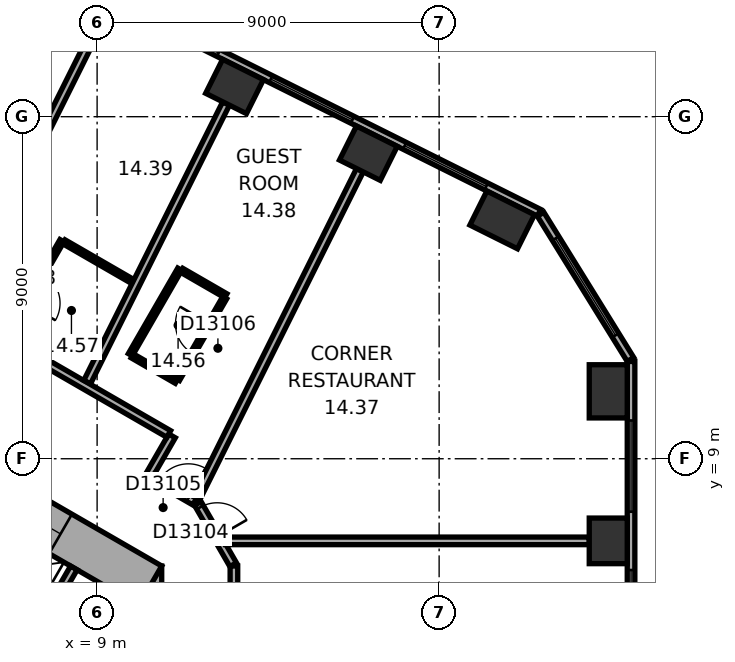
"""IFC4 building model, lengths in metres.
Left out: names, types, materials, properties, quantities, classifications, styles, units other than length and angle.
Written with IfcOpenShell. Run it as: python <this file> out.ifc"""

import sys

from ifc_helpers import new_model, si_unit, direction, frame, frame_2d, origin, origin_2d, place, context, subcontext, project, spatial, rectangle, extrude, element, fill, save


model = new_model("IFC4")
c1 = context("Model", 3, precision=1e-05, world=origin(), true_north=direction((0.0, 1.0)))
c2 = subcontext(c1, "Body", "Model", "MODEL_VIEW")
j1 = project(units=[si_unit("LENGTHUNIT", "METRE"), si_unit("PLANEANGLEUNIT", "RADIAN")], contexts=[c1])
p1 = place(None, origin())
s1 = spatial("IfcSite", under=j1, at=p1, CompositionType="ELEMENT")
p2 = place(p1, origin())
s2 = spatial("IfcBuilding", under=s1, at=p2, CompositionType="ELEMENT")
p3 = place(p2, frame((0.0, 0.0, 67.1)))
s3 = spatial("IfcBuildingStorey", under=s2, at=p3, CompositionType="ELEMENT", Elevation=67.1)
p4 = place(p3, frame((22.45, 6.839, 0.0), z_axis=(0.0, 0.0, 1.0), x_axis=(0.0, 1.0, 0.0)))
e1 = element("IfcColumn", 1, at=p4, inside=s3, PredefinedType="COLUMN", context=c2, shape_type="SweptSolid", body=[
    extrude(rectangle(XDim=1.2, YDim=1.0, at=origin_2d()), origin(), (0.0, 0.0, 1.0), 3.3),
])
for number, where, z_axis, x_axis in (
    (2, (22.45, 10.774, 0.0), (0.0, 0.0, 1.0), (0.0, 1.0, 0.0)),
    (3, (19.659, 15.284, 0.0), (0.0, 0.0, 1.0), (-0.895, 0.446, 0.0)),
):
    element("IfcColumn", number, at=place(p3, frame(where, z_axis=z_axis, x_axis=x_axis)), inside=s3, PredefinedType="COLUMN", context=c2, shape_type="SweptSolid", body=[
        extrude(rectangle(XDim=1.4, YDim=1.0, at=origin_2d()), origin(), (0.0, 0.0, 1.0), 3.3),
    ])
for number, where, z_axis, x_axis in (
    (4, (16.138, 17.04, 0.0), (0.0, 0.0, 1.0), (-0.895, 0.446, 0.0)),
    (5, (12.616, 18.795, 0.0), (0.0, 0.0, 1.0), (-0.895, 0.446, 0.0)),
):
    element("IfcColumn", number, at=place(p3, frame(where, z_axis=z_axis, x_axis=x_axis)), inside=s3, PredefinedType="COLUMN", context=c2, shape_type="SweptSolid", body=[
        extrude(rectangle(XDim=1.2, YDim=1.0, at=origin_2d()), origin(), (0.0, 0.0, 1.0), 3.3),
    ])
p5 = place(p3, frame((10.1, -6.177, 0.0), z_axis=(0.0, 0.0, 1.0), x_axis=(0.0, 1.0, 0.0)))
e6 = element("IfcWall", 6, at=p5, inside=s3, PredefinedType="SHEAR", context=c2, shape_type="SweptSolid", body=[
    extrude(rectangle(XDim=12.355, YDim=1.2, at=frame_2d((6.177, 0.0))), origin(), (0.0, 0.0, 1.0), 3.3),
])
p6 = place(p5, frame((6.378, 0.0, 0.0)))
e7 = element("IfcOpeningElement", 7, at=p6, cuts=e6, PredefinedType="OPENING", context=c2, shape_type="SweptSolid", body=[
    extrude(rectangle(XDim=1.5, YDim=2.1, at=frame_2d((0.75, 1.05))), frame((0.0, 0.61, 0.0), z_axis=(0.0, -1.0, 0.0), x_axis=(1.0, 0.0, 0.0)), (0.0, 0.0, 1.0), 1.22),
])
p7 = place(p5, frame((1.828, 0.0, 0.0)))
e8 = element("IfcOpeningElement", 8, at=p7, cuts=e6, PredefinedType="OPENING", context=c2, shape_type="SweptSolid", body=[
    extrude(rectangle(XDim=1.1, YDim=2.1, at=frame_2d((0.55, 1.05))), frame((0.0, 0.61, 0.0), z_axis=(0.0, -1.0, 0.0), x_axis=(1.0, 0.0, 0.0)), (0.0, 0.0, 1.0), 1.22),
])
p8 = place(p5, frame((4.427, 0.0, 0.0)))
e9 = element("IfcOpeningElement", 9, at=p8, cuts=e6, PredefinedType="OPENING", context=c2, shape_type="SweptSolid", body=[
    extrude(rectangle(XDim=1.1, YDim=2.1, at=frame_2d((0.55, 1.05))), frame((0.0, 0.61, 0.0), z_axis=(0.0, -1.0, 0.0), x_axis=(1.0, 0.0, 0.0)), (0.0, 0.0, 1.0), 1.22),
])
p9 = place(p3, frame((10.4, 5.658, 0.0), z_axis=(0.0, 0.0, 1.0), x_axis=(-0.866021384402, 0.500006961711, 0.0)))
e10 = element("IfcWall", 10, at=p9, inside=s3, PredefinedType="SHEAR", context=c2, shape_type="SweptSolid", body=[
    extrude(rectangle(XDim=12.355, YDim=1.2, at=frame_2d((6.178, 0.0))), origin(), (0.0, 0.0, 1.0), 3.3),
])
p10 = place(p9, frame((2.728, 0.0, 0.0)))
e11 = element("IfcOpeningElement", 11, at=p10, cuts=e10, PredefinedType="OPENING", context=c2, shape_type="SweptSolid", body=[
    extrude(rectangle(XDim=1.1, YDim=2.1, at=frame_2d((0.55, 1.05))), frame((0.0, 0.61, 0.0), z_axis=(0.0, -1.0, 0.0), x_axis=(1.0, 0.0, 0.0)), (0.0, 0.0, 1.0), 1.22),
])
p11 = place(p9, frame((5.328, 0.0, 0.0)))
e12 = element("IfcOpeningElement", 12, at=p11, cuts=e10, PredefinedType="OPENING", context=c2, shape_type="SweptSolid", body=[
    extrude(rectangle(XDim=1.1, YDim=2.1, at=frame_2d((0.55, 1.05))), frame((0.0, 0.61, 0.0), z_axis=(0.0, -1.0, 0.0), x_axis=(1.0, 0.0, 0.0)), (0.0, 0.0, 1.0), 1.22),
])
p12 = place(p9, frame((7.928, 0.0, 0.0)))
e13 = element("IfcOpeningElement", 13, at=p12, cuts=e10, PredefinedType="OPENING", context=c2, shape_type="SweptSolid", body=[
    extrude(rectangle(XDim=1.1, YDim=2.1, at=frame_2d((0.55, 1.05))), frame((0.0, 0.61, 0.0), z_axis=(0.0, -1.0, 0.0), x_axis=(1.0, 0.0, 0.0)), (0.0, 0.0, 1.0), 1.22),
])
p13 = place(p3, frame((23.05, -9.687, 0.0), z_axis=(0.0, 0.0, 1.0), x_axis=(0.0, 1.0, 0.0)))
e14 = element("IfcWall", 14, at=p13, inside=s3, PredefinedType="STANDARD", context=c2, shape_type="SweptSolid", body=[
    extrude(rectangle(XDim=21.246, YDim=0.2, at=frame_2d((10.623, 0.0))), origin(), (0.0, 0.0, 1.0), 3.3),
])
p14 = place(p13, frame((1.555, 0.0, 0.8)))
e15 = element("IfcOpeningElement", 15, at=p14, cuts=e14, PredefinedType="OPENING", context=c2, shape_type="SweptSolid", body=[
    extrude(rectangle(XDim=2.4, YDim=1.7, at=frame_2d((1.2, 0.85))), frame((0.0, 0.11, 0.0), z_axis=(0.0, -1.0, 0.0), x_axis=(1.0, 0.0, 0.0)), (0.0, 0.0, 1.0), 0.22),
])
p15 = place(p13, frame((5.489, 0.0, 0.8)))
e16 = element("IfcOpeningElement", 16, at=p15, cuts=e14, PredefinedType="OPENING", context=c2, shape_type="SweptSolid", body=[
    extrude(rectangle(XDim=2.4, YDim=1.7, at=frame_2d((1.2, 0.85))), frame((0.0, 0.11, 0.0), z_axis=(0.0, -1.0, 0.0), x_axis=(1.0, 0.0, 0.0)), (0.0, 0.0, 1.0), 0.22),
])
p16 = place(p13, frame((9.424, 0.0, 0.8)))
e17 = element("IfcOpeningElement", 17, at=p16, cuts=e14, PredefinedType="OPENING", context=c2, shape_type="SweptSolid", body=[
    extrude(rectangle(XDim=2.4, YDim=1.7, at=frame_2d((1.2, 0.85))), frame((0.0, 0.11, 0.0), z_axis=(0.0, -1.0, 0.0), x_axis=(1.0, 0.0, 0.0)), (0.0, 0.0, 1.0), 0.22),
])
p17 = place(p13, frame((13.358, 0.0, 0.8)))
e18 = element("IfcOpeningElement", 18, at=p17, cuts=e14, PredefinedType="OPENING", context=c2, shape_type="SweptSolid", body=[
    extrude(rectangle(XDim=2.4, YDim=1.7, at=frame_2d((1.2, 0.85))), frame((0.0, 0.11, 0.0), z_axis=(0.0, -1.0, 0.0), x_axis=(1.0, 0.0, 0.0)), (0.0, 0.0, 1.0), 0.22),
])
p18 = place(p13, frame((17.293, 0.0, 0.8)))
e19 = element("IfcOpeningElement", 19, at=p18, cuts=e14, PredefinedType="OPENING", context=c2, shape_type="SweptSolid", body=[
    extrude(rectangle(XDim=2.4, YDim=1.7, at=frame_2d((1.2, 0.85))), frame((0.0, 0.11, 0.0), z_axis=(0.0, -1.0, 0.0), x_axis=(1.0, 0.0, 0.0)), (0.0, 0.0, 1.0), 0.22),
])
p19 = place(p3, frame((23.035, 11.612, 0.0), z_axis=(0.0, 0.0, 1.0), x_axis=(-0.526160091227, 0.850385535155, 0.0)))
e20 = element("IfcWall", 20, at=p19, inside=s3, PredefinedType="STANDARD", context=c2, shape_type="SweptSolid", body=[
    extrude(rectangle(XDim=4.494, YDim=0.2, at=frame_2d((2.247, 0.0))), origin(), (0.0, 0.0, 1.0), 3.3),
])
p20 = place(p19, frame((0.747, 0.0, 0.8)))
e21 = element("IfcOpeningElement", 21, at=p20, cuts=e20, PredefinedType="OPENING", context=c2, shape_type="SweptSolid", body=[
    extrude(rectangle(XDim=3.0, YDim=1.7, at=frame_2d((1.5, 0.85))), frame((0.0, 0.11, 0.0), z_axis=(0.0, -1.0, 0.0), x_axis=(1.0, 0.0, 0.0)), (0.0, 0.0, 1.0), 0.22),
])
p21 = place(p3, frame((20.63, 15.47, 0.0), z_axis=(0.0, 0.0, 1.0), x_axis=(-0.894934518609, 0.446197498203, 0.0)))
e22 = element("IfcWall", 22, at=p21, inside=s3, PredefinedType="STANDARD", context=c2, shape_type="SweptSolid", body=[
    extrude(rectangle(XDim=21.246, YDim=0.2, at=frame_2d((10.623, 0.0))), origin(), (0.0, 0.0, 1.0), 3.3),
])
p22 = place(p21, frame((1.553, 0.0, 0.8)))
e23 = element("IfcOpeningElement", 23, at=p22, cuts=e22, PredefinedType="OPENING", context=c2, shape_type="SweptSolid", body=[
    extrude(rectangle(XDim=2.4, YDim=1.7, at=frame_2d((1.2, 0.85))), frame((0.0, 0.11, 0.0), z_axis=(0.0, -1.0, 0.0), x_axis=(1.0, 0.0, 0.0)), (0.0, 0.0, 1.0), 0.22),
])
p23 = place(p21, frame((5.488, 0.0, 0.8)))
e24 = element("IfcOpeningElement", 24, at=p23, cuts=e22, PredefinedType="OPENING", context=c2, shape_type="SweptSolid", body=[
    extrude(rectangle(XDim=2.4, YDim=1.7, at=frame_2d((1.2, 0.85))), frame((0.0, 0.11, 0.0), z_axis=(0.0, -1.0, 0.0), x_axis=(1.0, 0.0, 0.0)), (0.0, 0.0, 1.0), 0.22),
])
p24 = place(p21, frame((9.422, 0.0, 0.8)))
e25 = element("IfcOpeningElement", 25, at=p24, cuts=e22, PredefinedType="OPENING", context=c2, shape_type="SweptSolid", body=[
    extrude(rectangle(XDim=2.4, YDim=1.7, at=frame_2d((1.2, 0.85))), frame((0.0, 0.11, 0.0), z_axis=(0.0, -1.0, 0.0), x_axis=(1.0, 0.0, 0.0)), (0.0, 0.0, 1.0), 0.22),
])
p25 = place(p21, frame((13.357, 0.0, 0.8)))
e26 = element("IfcOpeningElement", 26, at=p25, cuts=e22, PredefinedType="OPENING", context=c2, shape_type="SweptSolid", body=[
    extrude(rectangle(XDim=2.4, YDim=1.7, at=frame_2d((1.2, 0.85))), frame((0.0, 0.11, 0.0), z_axis=(0.0, -1.0, 0.0), x_axis=(1.0, 0.0, 0.0)), (0.0, 0.0, 1.0), 0.22),
])
p26 = place(p21, frame((17.292, 0.0, 0.8)))
e27 = element("IfcOpeningElement", 27, at=p26, cuts=e22, PredefinedType="OPENING", context=c2, shape_type="SweptSolid", body=[
    extrude(rectangle(XDim=2.4, YDim=1.7, at=frame_2d((1.2, 0.85))), frame((0.0, 0.11, 0.0), z_axis=(0.0, -1.0, 0.0), x_axis=(1.0, 0.0, 0.0)), (0.0, 0.0, 1.0), 0.22),
])
p27 = place(p3, frame((7.287, 4.222, 0.0), z_axis=(0.0, 0.0, 1.0), x_axis=(0.499946605688, 0.86605622881, 0.0)))
e28 = element("IfcWall", 28, at=p27, inside=s3, PredefinedType="PARTITIONING", context=c2, shape_type="SweptSolid", body=[
    extrude(rectangle(XDim=2.2, YDim=0.2, at=frame_2d((1.1, 0.0))), origin(), (0.0, 0.0, 1.0), 3.05),
])
p28 = place(p3, frame((6.625, 12.227, 0.0), z_axis=(0.0, 0.0, 1.0), x_axis=(0.500023687443, 0.866011727401, 0.0)))
e29 = element("IfcWall", 29, at=p28, inside=s3, PredefinedType="PARTITIONING", context=c2, shape_type="SweptSolid", body=[
    extrude(rectangle(XDim=2.9, YDim=0.12, at=frame_2d((1.45, 0.0))), origin(), (0.0, 0.0, 1.0), 3.05),
])
p29 = place(p28, frame((1.0, 0.0, 0.0)))
e30 = element("IfcOpeningElement", 30, at=p29, cuts=e29, PredefinedType="OPENING", context=c2, shape_type="SweptSolid", body=[
    extrude(rectangle(XDim=0.9, YDim=2.1, at=frame_2d((0.45, 1.05))), frame((0.0, 0.07, 0.0), z_axis=(0.0, -1.0, 0.0), x_axis=(1.0, 0.0, 0.0)), (0.0, 0.0, 1.0), 0.14),
])
p30 = place(p3, frame((8.127, 14.708, 0.0), z_axis=(0.0, 0.0, 1.0), x_axis=(0.866065472234, -0.499930592986, 0.0)))
e31 = element("IfcWall", 31, at=p30, inside=s3, PredefinedType="PARTITIONING", context=c2, shape_type="SweptSolid", body=[
    extrude(rectangle(XDim=2.098, YDim=0.12, at=frame_2d((1.049, 0.0))), origin(), (0.0, 0.0, 1.0), 3.05),
])
p31 = place(p3, frame((8.872, 20.104, 0.0), z_axis=(0.0, 0.0, 1.0), x_axis=(-0.446218378653, -0.894924107706, 0.0)))
e32 = element("IfcWall", 32, at=p31, inside=s3, PredefinedType="PARTITIONING", context=c2, shape_type="SweptSolid", body=[
    extrude(rectangle(XDim=7.95, YDim=0.2, at=frame_2d((3.975, 0.0))), origin(), (0.0, 0.0, 1.0), 3.05),
])
p32 = place(p3, frame((9.875, 11.736, 0.0), z_axis=(0.0, 0.0, 1.0), x_axis=(0.499936506574, 0.866062058628, 0.0)))
e33 = element("IfcWall", 33, at=p32, inside=s3, PredefinedType="PARTITIONING", context=c2, shape_type="SweptSolid", body=[
    extrude(rectangle(XDim=2.6, YDim=0.12, at=frame_2d((1.3, 0.0))), origin(), (0.0, 0.0, 1.0), 3.05),
])
p33 = place(p3, frame((10.371, 8.561, 0.0), z_axis=(0.0, 0.0, 1.0), x_axis=(0.499986357472, 0.866033280158, 0.0)))
e34 = element("IfcWall", 34, at=p33, inside=s3, PredefinedType="PARTITIONING", context=c2, shape_type="SweptSolid", body=[
    extrude(rectangle(XDim=1.201, YDim=0.2, at=frame_2d((0.601, 0.0))), origin(), (0.0, 0.0, 1.0), 3.05),
])
p34 = place(p3, frame((10.885, 9.652, 0.0), z_axis=(0.0, 0.0, 1.0), x_axis=(-0.866033868542, 0.499985338323, 0.0)))
e35 = element("IfcWall", 35, at=p34, inside=s3, PredefinedType="PARTITIONING", context=c2, shape_type="SweptSolid", body=[
    extrude(rectangle(XDim=8.602, YDim=0.2, at=frame_2d((4.301, 0.0))), origin(), (0.0, 0.0, 1.0), 3.05),
])
p35 = place(p34, frame((5.302, 0.0, 0.0)))
e36 = element("IfcOpeningElement", 36, at=p35, cuts=e35, PredefinedType="OPENING", context=c2, shape_type="SweptSolid", body=[
    extrude(rectangle(XDim=0.9, YDim=2.1, at=frame_2d((0.45, 1.05))), frame((0.0, 0.11, 0.0), z_axis=(0.0, -1.0, 0.0), x_axis=(1.0, 0.0, 0.0)), (0.0, 0.0, 1.0), 0.22),
])
for number, where, z_axis, x_axis in (
    (37, (11.087, 11.036, 0.0), (0.0, 0.0, 1.0), (-0.866, 0.5, 0.0)),
    (38, (11.226, 13.958, 0.0), (0.0, 0.0, 1.0), (0.866, -0.5, 0.0)),
):
    element("IfcWall", number, at=place(p3, frame(where, z_axis=z_axis, x_axis=x_axis)), inside=s3, PredefinedType="PARTITIONING", context=c2, shape_type="SweptSolid", body=[
        extrude(rectangle(XDim=1.34, YDim=0.12, at=frame_2d((0.67, 0.0))), origin(), (0.0, 0.0, 1.0), 3.05),
    ])
p36 = place(p3, frame((11.566, 7.871, 0.0), z_axis=(0.0, 0.0, 1.0), x_axis=(-0.866004557827, 0.500036104519, 0.0)))
e39 = element("IfcWall", 39, at=p36, inside=s3, PredefinedType="PARTITIONING", context=c2, shape_type="SweptSolid", body=[
    extrude(rectangle(XDim=1.28, YDim=0.2, at=frame_2d((0.64, 0.0))), origin(), (0.0, 0.0, 1.0), 3.05),
])
p37 = place(p36, frame((0.19, 0.0, 0.0)))
e40 = element("IfcOpeningElement", 40, at=p37, cuts=e39, PredefinedType="OPENING", context=c2, shape_type="SweptSolid", body=[
    extrude(rectangle(XDim=0.9, YDim=2.1, at=frame_2d((0.45, 1.05))), frame((0.0, 0.11, 0.0), z_axis=(0.0, -1.0, 0.0), x_axis=(1.0, 0.0, 0.0)), (0.0, 0.0, 1.0), 0.22),
])
p38 = place(p3, frame((12.357, 13.236, 0.0), z_axis=(0.0, 0.0, 1.0), x_axis=(-0.50000366821, -0.866023285932, 0.0)))
e41 = element("IfcWall", 41, at=p38, inside=s3, PredefinedType="PARTITIONING", context=c2, shape_type="SweptSolid", body=[
    extrude(rectangle(XDim=2.48, YDim=0.12, at=frame_2d((1.24, 0.0))), origin(), (0.0, 0.0, 1.0), 3.05),
])
p39 = place(p38, frame((0.79, 0.0, 0.0)))
e42 = element("IfcOpeningElement", 42, at=p39, cuts=e41, PredefinedType="OPENING", context=c2, shape_type="SweptSolid", body=[
    extrude(rectangle(XDim=0.9, YDim=2.1, at=frame_2d((0.45, 1.05))), frame((0.0, 0.07, 0.0), z_axis=(0.0, -1.0, 0.0), x_axis=(1.0, 0.0, 0.0)), (0.0, 0.0, 1.0), 0.14),
])
p40 = place(p3, frame((12.393, 18.348, 0.0), z_axis=(0.0, 0.0, 1.0), x_axis=(-0.446176022699, -0.894945225569, 0.0)))
e43 = element("IfcWall", 43, at=p40, inside=s3, PredefinedType="PARTITIONING", context=c2, shape_type="SweptSolid", body=[
    extrude(rectangle(XDim=8.191, YDim=0.2, at=frame_2d((4.095, 0.0))), origin(), (0.0, 0.0, 1.0), 2.6),
])
p41 = place(p3, frame((12.58, 6.212, 0.0), z_axis=(0.0, 0.0, 1.0), x_axis=(-0.500063286585, 0.865988862174, 0.0)))
e44 = element("IfcWall", 44, at=p41, inside=s3, PredefinedType="PARTITIONING", context=c2, shape_type="SweptSolid", body=[
    extrude(rectangle(XDim=1.86, YDim=0.2, at=frame_2d((0.93, 0.0))), origin(), (0.0, 0.0, 1.0), 3.05),
])
p42 = place(p41, frame((0.842, 0.0, 0.0)))
e45 = element("IfcOpeningElement", 45, at=p42, cuts=e44, PredefinedType="OPENING", context=c2, shape_type="SweptSolid", body=[
    extrude(rectangle(XDim=0.9, YDim=2.1, at=frame_2d((0.45, 1.05))), frame((0.0, 0.11, 0.0), z_axis=(0.0, -1.0, 0.0), x_axis=(1.0, 0.0, 0.0)), (0.0, 0.0, 1.0), 0.22),
])
p43 = place(p3, frame((12.6, 3.004, 0.0), z_axis=(0.0, 0.0, 1.0), x_axis=(0.0, 1.0, 0.0)))
e46 = element("IfcWall", 46, at=p43, inside=s3, PredefinedType="PARTITIONING", context=c2, shape_type="SweptSolid", body=[
    extrude(rectangle(XDim=3.173, YDim=0.2, at=frame_2d((1.586, 0.0))), origin(), (0.0, 0.0, 1.0), 3.05),
])
p44 = place(p43, frame((1.136, 0.0, 0.0)))
e47 = element("IfcOpeningElement", 47, at=p44, cuts=e46, PredefinedType="OPENING", context=c2, shape_type="SweptSolid", body=[
    extrude(rectangle(XDim=0.9, YDim=2.1, at=frame_2d((0.45, 1.05))), frame((0.0, 0.11, 0.0), z_axis=(0.0, -1.0, 0.0), x_axis=(1.0, 0.0, 0.0)), (0.0, 0.0, 1.0), 0.22),
])
p45 = place(p3, frame((15.915, 16.592, 0.0), z_axis=(0.0, 0.0, 1.0), x_axis=(-0.446199736347, -0.894933402709, 0.0)))
e48 = element("IfcWall", 48, at=p45, inside=s3, PredefinedType="PARTITIONING", context=c2, shape_type="SweptSolid", body=[
    extrude(rectangle(XDim=9.635, YDim=0.2, at=frame_2d((4.817, 0.0))), origin(), (0.0, 0.0, 1.0), 3.05),
])
p46 = place(p3, frame((21.95, 6.839, 0.0), z_axis=(0.0, 0.0, 1.0), x_axis=(-1.0, 0.0, 0.0)))
e49 = element("IfcWall", 49, at=p46, inside=s3, PredefinedType="PARTITIONING", context=c2, shape_type="SweptSolid", body=[
    extrude(rectangle(XDim=9.572, YDim=0.2, at=frame_2d((4.786, 0.0))), origin(), (0.0, 0.0, 1.0), 3.05),
])
p47 = place(p17, origin())
e50 = element("IfcWindow", 50, at=p47, inside=s3, PartitioningType="SINGLE_PANEL", PredefinedType="WINDOW", context=c2, shape_type="SweptSolid", body=[
    extrude(rectangle(XDim=2.4, YDim=1.7, at=frame_2d((1.2, 0.85))), frame((0.0, 0.03, 0.0), z_axis=(0.0, -1.0, 0.0), x_axis=(1.0, 0.0, 0.0)), (0.0, 0.0, 1.0), 0.06),
])
fill(e18, e50)
p48 = place(p18, origin())
e51 = element("IfcWindow", 51, at=p48, inside=s3, PartitioningType="SINGLE_PANEL", PredefinedType="WINDOW", context=c2, shape_type="SweptSolid", body=[
    extrude(rectangle(XDim=2.4, YDim=1.7, at=frame_2d((1.2, 0.85))), frame((0.0, 0.03, 0.0), z_axis=(0.0, -1.0, 0.0), x_axis=(1.0, 0.0, 0.0)), (0.0, 0.0, 1.0), 0.06),
])
fill(e19, e51)
p49 = place(p20, origin())
e52 = element("IfcWindow", 52, at=p49, inside=s3, PartitioningType="SINGLE_PANEL", PredefinedType="WINDOW", context=c2, shape_type="SweptSolid", body=[
    extrude(rectangle(XDim=3.0, YDim=1.7, at=frame_2d((1.5, 0.85))), frame((0.0, 0.03, 0.0), z_axis=(0.0, -1.0, 0.0), x_axis=(1.0, 0.0, 0.0)), (0.0, 0.0, 1.0), 0.06),
])
fill(e21, e52)
p50 = place(p22, origin())
e53 = element("IfcWindow", 53, at=p50, inside=s3, PartitioningType="SINGLE_PANEL", PredefinedType="WINDOW", context=c2, shape_type="SweptSolid", body=[
    extrude(rectangle(XDim=2.4, YDim=1.7, at=frame_2d((1.2, 0.85))), frame((0.0, 0.03, 0.0), z_axis=(0.0, -1.0, 0.0), x_axis=(1.0, 0.0, 0.0)), (0.0, 0.0, 1.0), 0.06),
])
fill(e23, e53)
p51 = place(p23, origin())
e54 = element("IfcWindow", 54, at=p51, inside=s3, PartitioningType="SINGLE_PANEL", PredefinedType="WINDOW", context=c2, shape_type="SweptSolid", body=[
    extrude(rectangle(XDim=2.4, YDim=1.7, at=frame_2d((1.2, 0.85))), frame((0.0, 0.03, 0.0), z_axis=(0.0, -1.0, 0.0), x_axis=(1.0, 0.0, 0.0)), (0.0, 0.0, 1.0), 0.06),
])
fill(e24, e54)
p52 = place(p24, origin())
e55 = element("IfcWindow", 55, at=p52, inside=s3, PartitioningType="SINGLE_PANEL", PredefinedType="WINDOW", context=c2, shape_type="SweptSolid", body=[
    extrude(rectangle(XDim=2.4, YDim=1.7, at=frame_2d((1.2, 0.85))), frame((0.0, 0.03, 0.0), z_axis=(0.0, -1.0, 0.0), x_axis=(1.0, 0.0, 0.0)), (0.0, 0.0, 1.0), 0.06),
])
fill(e25, e55)
p53 = place(p10, origin())
e56 = element("IfcDoor", 56, at=p53, inside=s3, OperationType="DOUBLE_DOOR_SLIDING", PredefinedType="DOOR", context=c2, shape_type="SweptSolid", body=[
    extrude(rectangle(XDim=1.1, YDim=2.1, at=frame_2d((0.55, 1.05))), frame((0.0, 0.025, 0.0), z_axis=(0.0, -1.0, 0.0), x_axis=(1.0, 0.0, 0.0)), (0.0, 0.0, 1.0), 0.05),
])
fill(e11, e56)
p54 = place(p42, origin())
e57 = element("IfcDoor", 57, at=p54, inside=s3, OperationType="SINGLE_SWING_LEFT", PredefinedType="DOOR", context=c2, shape_type="SweptSolid", body=[
    extrude(rectangle(XDim=0.9, YDim=2.1, at=frame_2d((0.45, 1.05))), frame((0.0, 0.025, 0.0), z_axis=(0.0, -1.0, 0.0), x_axis=(1.0, 0.0, 0.0)), (0.0, 0.0, 1.0), 0.05),
])
fill(e45, e57)
p55 = place(p37, origin())
e58 = element("IfcDoor", 58, at=p55, inside=s3, OperationType="SINGLE_SWING_LEFT", PredefinedType="DOOR", context=c2, shape_type="SweptSolid", body=[
    extrude(rectangle(XDim=0.9, YDim=2.1, at=frame_2d((0.45, 1.05))), frame((0.0, 0.025, 0.0), z_axis=(0.0, -1.0, 0.0), x_axis=(1.0, 0.0, 0.0)), (0.0, 0.0, 1.0), 0.05),
])
fill(e40, e58)
p56 = place(p39, origin())
e59 = element("IfcDoor", 59, at=p56, inside=s3, OperationType="SINGLE_SWING_LEFT", PredefinedType="DOOR", context=c2, shape_type="SweptSolid", body=[
    extrude(rectangle(XDim=0.9, YDim=2.1, at=frame_2d((0.45, 1.05))), frame((0.0, 0.025, 0.0), z_axis=(0.0, -1.0, 0.0), x_axis=(1.0, 0.0, 0.0)), (0.0, 0.0, 1.0), 0.05),
])
fill(e42, e59)
save(model, sys.argv[1])
